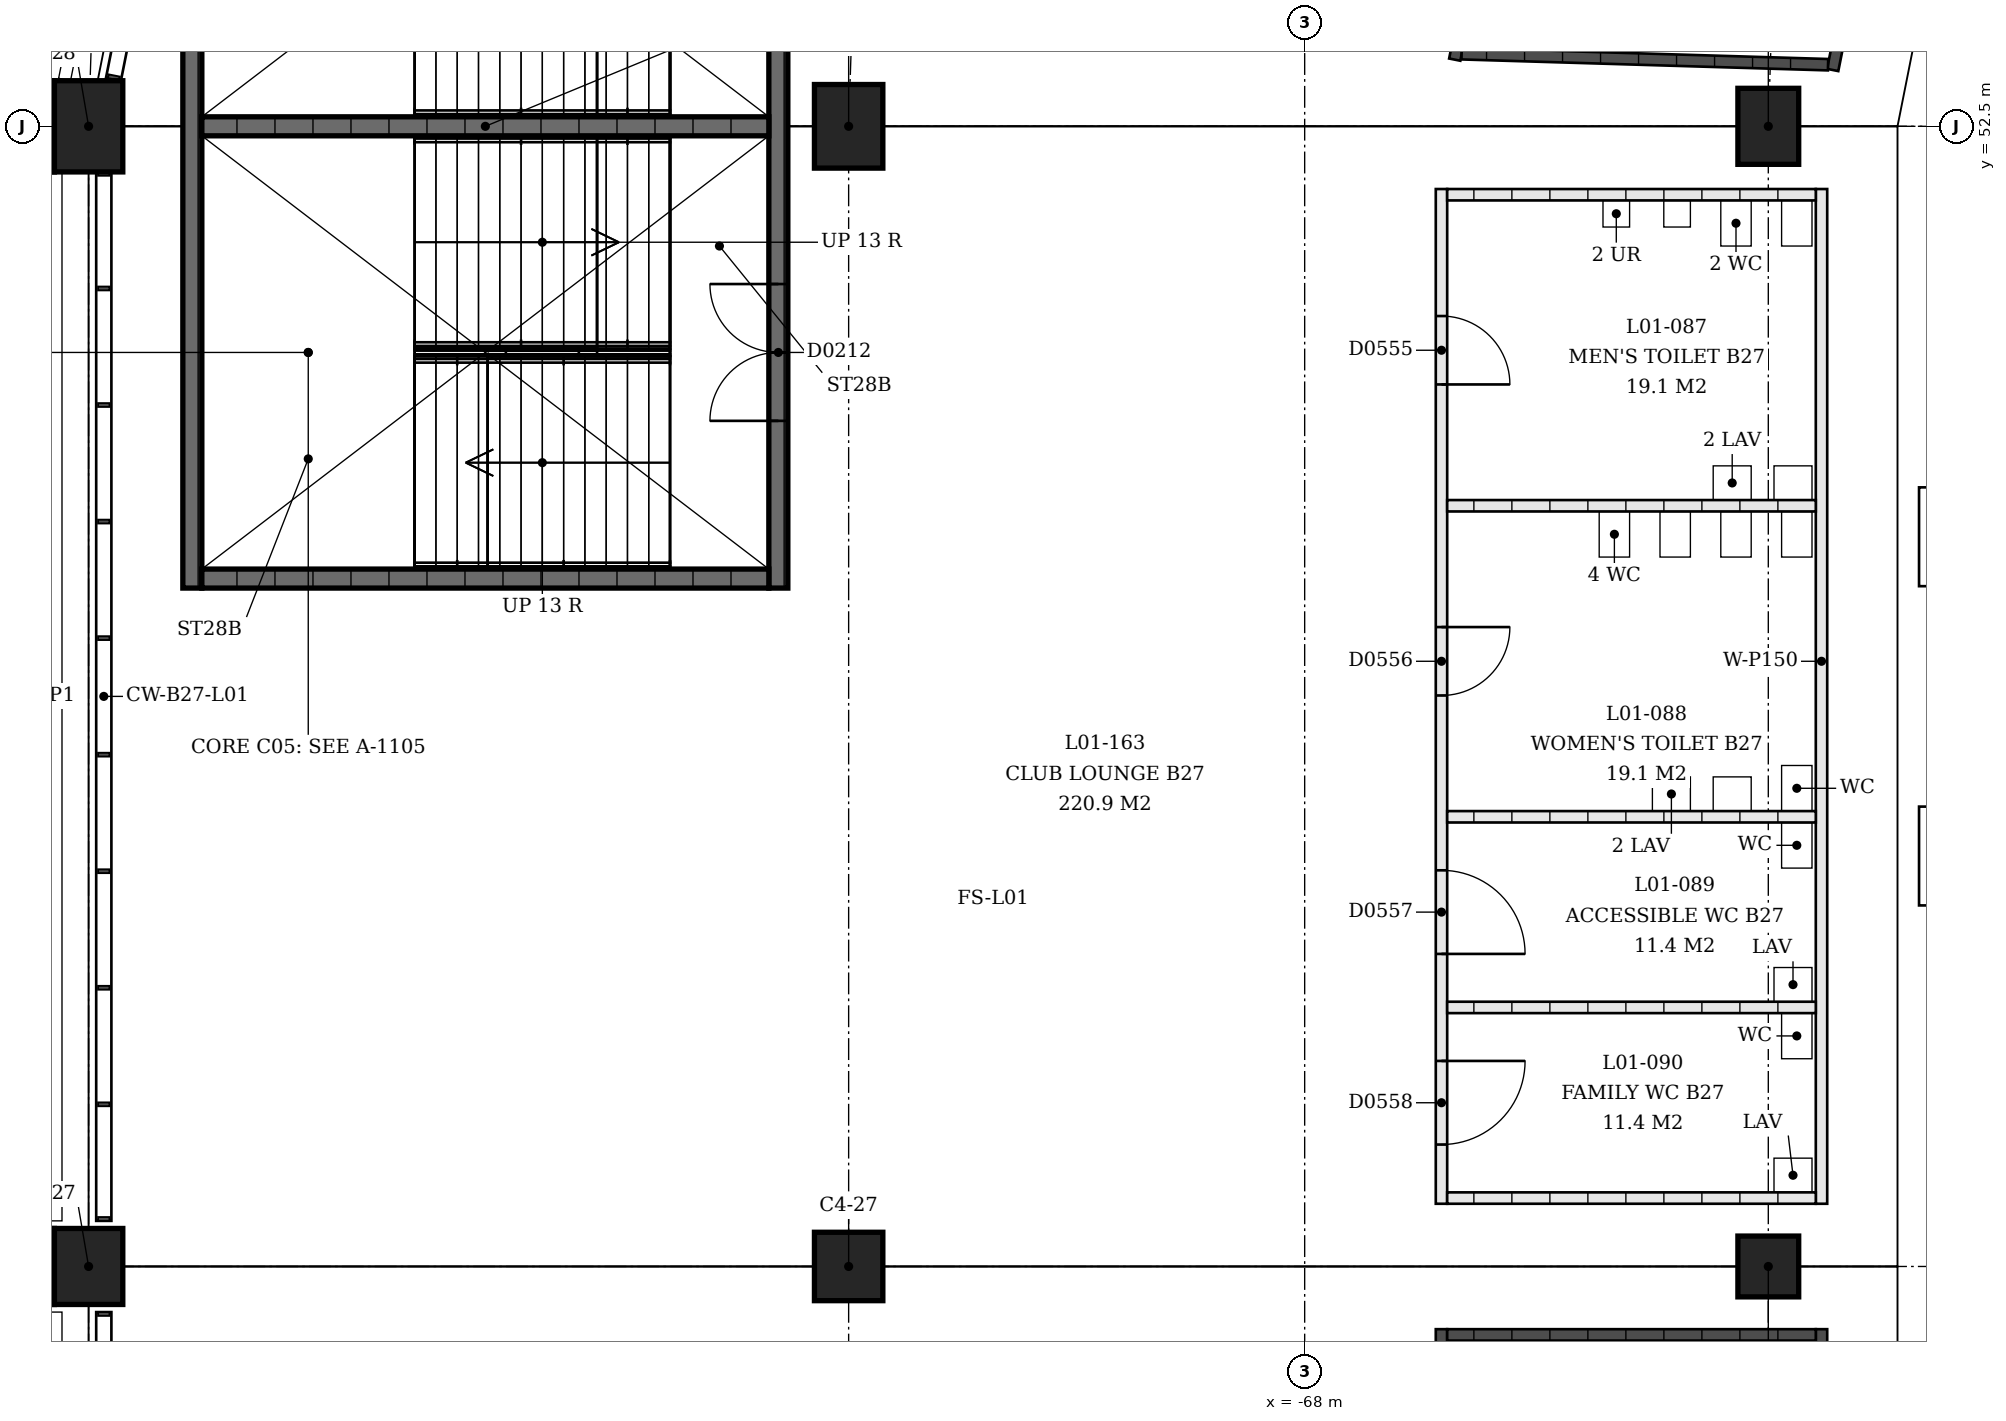
"""IFC4 building model, lengths in metres.
Left out: names, types, materials, properties, quantities, classifications, styles, units other than length and angle.
Written with IfcOpenShell. Run it as: python <this file> out.ifc"""

import sys

from ifc_helpers import new_model, si_unit, direction, frame, frame_2d, origin, origin_2d, place, context, subcontext, project, spatial, rectangle, extrude, element, fill, save


model = new_model("IFC4")
c1 = context("Model", 3, precision=1e-05, world=origin(), true_north=direction((0.0, 1.0)))
c2 = subcontext(c1, "Body", "Model", "MODEL_VIEW")
j1 = project(units=[si_unit("LENGTHUNIT", "METRE"), si_unit("PLANEANGLEUNIT", "RADIAN")], contexts=[c1])
p1 = place(None, origin())
s1 = spatial("IfcSite", under=j1, at=p1, CompositionType="ELEMENT")
p2 = place(p1, origin())
s2 = spatial("IfcBuilding", under=s1, at=p2, CompositionType="ELEMENT")
p3 = place(p2, frame((0.0, 0.0, 4.5)))
s3 = spatial("IfcBuildingStorey", under=s2, at=p3, CompositionType="ELEMENT", Elevation=4.5)
p4 = place(p3, frame((-61.9, 37.5, 0.0), z_axis=(0.0, 0.0, 1.0), x_axis=(0.0, -1.0, 0.0)))
e1 = element("IfcColumn", 1, at=p4, inside=s3, PredefinedType="COLUMN", context=c2, shape_type="SweptSolid", body=[
    extrude(rectangle(XDim=0.8, YDim=0.8, at=origin_2d()), origin(), (0.0, 0.0, 1.0), 4.5),
])
p5 = place(p3, frame((-74.0, 37.5, 0.0), z_axis=(0.0, 0.0, 1.0), x_axis=(0.0, -1.0, 0.0)))
e2 = element("IfcColumn", 2, at=p5, inside=s3, PredefinedType="COLUMN", context=c2, shape_type="SweptSolid", body=[
    extrude(rectangle(XDim=0.9, YDim=0.9, at=origin_2d()), origin(), (0.0, 0.0, 1.0), 4.5),
])
p6 = place(p3, frame((-84.0, 37.5, 0.0), z_axis=(0.0, 0.0, 1.0), x_axis=(0.0, -1.0, 0.0)))
e3 = element("IfcColumn", 3, at=p6, inside=s3, PredefinedType="COLUMN", context=c2, shape_type="SweptSolid", body=[
    extrude(rectangle(XDim=1.0, YDim=0.9, at=origin_2d()), origin(), (0.0, 0.0, 1.0), 4.5),
])
p7 = place(p3, frame((-61.9, 52.5, 0.0), z_axis=(0.0, 0.0, 1.0), x_axis=(0.0, -1.0, 0.0)))
e4 = element("IfcColumn", 4, at=p7, inside=s3, PredefinedType="COLUMN", context=c2, shape_type="SweptSolid", body=[
    extrude(rectangle(XDim=1.0, YDim=0.8, at=origin_2d()), origin(), (0.0, 0.0, 1.0), 4.5),
])
p8 = place(p3, frame((-74.0, 52.5, 0.0), z_axis=(0.0, 0.0, 1.0), x_axis=(0.0, -1.0, 0.0)))
e5 = element("IfcColumn", 5, at=p8, inside=s3, PredefinedType="COLUMN", context=c2, shape_type="SweptSolid", body=[
    extrude(rectangle(XDim=1.1, YDim=0.9, at=origin_2d()), origin(), (0.0, 0.0, 1.0), 4.5),
])
p9 = place(p3, frame((-84.0, 52.5, 0.0), z_axis=(0.0, 0.0, 1.0), x_axis=(0.0, -1.0, 0.0)))
e6 = element("IfcColumn", 6, at=p9, inside=s3, PredefinedType="COLUMN", context=c2, shape_type="SweptSolid", body=[
    extrude(rectangle(XDim=1.2, YDim=0.9, at=origin_2d()), origin(), (0.0, 0.0, 1.0), 4.5),
])
p10 = place(p3, frame((-74.925, 58.575, 0.0), z_axis=(0.0, 0.0, 1.0), x_axis=(0.0, -1.0, 0.0)))
e7 = element("IfcWall", 7, at=p10, inside=s3, PredefinedType="SHEAR", context=c2, shape_type="SweptSolid", body=[
    extrude(rectangle(XDim=12.15, YDim=0.25, at=frame_2d((6.075, 0.0))), origin(), (0.0, 0.0, 1.0), 4.09),
])
p11 = place(p10, frame((2.2, 0.0, 0.0)))
e8 = element("IfcOpeningElement", 8, at=p11, cuts=e7, PredefinedType="OPENING", context=c2, shape_type="SweptSolid", body=[
    extrude(rectangle(XDim=1.8, YDim=2.1, at=frame_2d((0.9, 1.05))), frame((0.0, 0.125, 0.0), z_axis=(0.0, -1.0, 0.0), x_axis=(1.0, 0.0, 0.0)), (0.0, 0.0, 1.0), 0.25),
])
p12 = place(p10, frame((8.15, 0.0, 0.0)))
e9 = element("IfcOpeningElement", 9, at=p12, cuts=e7, PredefinedType="OPENING", context=c2, shape_type="SweptSolid", body=[
    extrude(rectangle(XDim=1.8, YDim=2.1, at=frame_2d((0.9, 1.05))), frame((0.0, 0.125, 0.0), z_axis=(0.0, -1.0, 0.0), x_axis=(1.0, 0.0, 0.0)), (0.0, 0.0, 1.0), 0.25),
])
p13 = place(p3, frame((-82.635, 58.575, 0.0), z_axis=(0.0, 0.0, 1.0), x_axis=(0.0, -1.0, 0.0)))
e10 = element("IfcWall", 10, at=p13, inside=s3, PredefinedType="SHEAR", context=c2, shape_type="SweptSolid", body=[
    extrude(rectangle(XDim=12.15, YDim=0.25, at=frame_2d((6.075, 0.0))), origin(), (0.0, 0.0, 1.0), 4.09),
])
for number, where, z_axis, x_axis in (
    (11, (-75.05, 46.55, 0.0), (0.0, 0.0, 1.0), (-1.0, 0.0, 0.0)),
    (12, (-75.05, 52.5, 0.0), (0.0, 0.0, 1.0), (-1.0, 0.0, 0.0)),
):
    element("IfcWall", number, at=place(p3, frame(where, z_axis=z_axis, x_axis=x_axis)), inside=s3, PredefinedType="SHEAR", context=c2, shape_type="SweptSolid", body=[
        extrude(rectangle(XDim=7.46, YDim=0.25, at=frame_2d((3.73, 0.0))), origin(), (0.0, 0.0, 1.0), 4.09),
    ])
p14 = place(p3, frame((-61.2, 23.325, 0.0), z_axis=(0.0, 0.0, 1.0), x_axis=(0.0, 1.0, 0.0)))
e13 = element("IfcWall", 13, at=p14, inside=s3, PredefinedType="SOLIDWALL", context=c2, shape_type="SweptSolid", body=[
    extrude(rectangle(XDim=13.35, YDim=0.15, at=frame_2d((6.675, 0.0))), origin(), (0.0, 0.0, 1.0), 3.0),
])
p15 = place(p3, frame((-66.2, 23.325, 0.0), z_axis=(0.0, 0.0, 1.0), x_axis=(0.0, 1.0, 0.0)))
e14 = element("IfcWall", 14, at=p15, inside=s3, PredefinedType="SOLIDWALL", context=c2, shape_type="SweptSolid", body=[
    extrude(rectangle(XDim=13.35, YDim=0.15, at=frame_2d((6.675, 0.0))), origin(), (0.0, 0.0, 1.0), 3.0),
])
p16 = place(p15, frame((2.875, 0.0, 0.0)))
e15 = element("IfcOpeningElement", 15, at=p16, cuts=e14, PredefinedType="OPENING", context=c2, shape_type="SweptSolid", body=[
    extrude(rectangle(XDim=1.0, YDim=2.1, at=frame_2d((0.5, 1.05))), frame((0.0, 0.075, 0.0), z_axis=(0.0, -1.0, 0.0), x_axis=(1.0, 0.0, 0.0)), (0.0, 0.0, 1.0), 0.15),
])
p17 = place(p15, frame((9.475, 0.0, 0.0)))
e16 = element("IfcOpeningElement", 16, at=p17, cuts=e14, PredefinedType="OPENING", context=c2, shape_type="SweptSolid", body=[
    extrude(rectangle(XDim=1.0, YDim=2.1, at=frame_2d((0.5, 1.05))), frame((0.0, 0.075, 0.0), z_axis=(0.0, -1.0, 0.0), x_axis=(1.0, 0.0, 0.0)), (0.0, 0.0, 1.0), 0.15),
])
p18 = place(p3, frame((-61.275, 36.6, 0.0), z_axis=(0.0, 0.0, 1.0), x_axis=(-1.0, 0.0, 0.0)))
e17 = element("IfcWall", 17, at=p18, inside=s3, PredefinedType="SOLIDWALL", context=c2, shape_type="SweptSolid", body=[
    extrude(rectangle(XDim=4.85, YDim=0.15, at=frame_2d((2.425, 0.0))), origin(), (0.0, 0.0, 1.0), 3.0),
])
p19 = place(p3, frame((-61.2, 51.675, 0.0), z_axis=(0.0, 0.0, 1.0), x_axis=(0.0, -1.0, 0.0)))
e18 = element("IfcWall", 18, at=p19, inside=s3, PredefinedType="PARTITIONING", context=c2, shape_type="SweptSolid", body=[
    extrude(rectangle(XDim=13.35, YDim=0.15, at=frame_2d((6.675, 0.0))), origin(), (0.0, 0.0, 1.0), 3.0),
])
p20 = place(p3, frame((-66.2, 51.675, 0.0), z_axis=(0.0, 0.0, 1.0), x_axis=(0.0, -1.0, 0.0)))
e19 = element("IfcWall", 19, at=p20, inside=s3, PredefinedType="PARTITIONING", context=c2, shape_type="SweptSolid", body=[
    extrude(rectangle(XDim=13.35, YDim=0.15, at=frame_2d((6.675, 0.0))), origin(), (0.0, 0.0, 1.0), 3.0),
])
p21 = place(p20, frame((1.671, 0.0, 0.0)))
e20 = element("IfcOpeningElement", 20, at=p21, cuts=e19, PredefinedType="OPENING", context=c2, shape_type="SweptSolid", body=[
    extrude(rectangle(XDim=0.9, YDim=2.1, at=frame_2d((0.45, 1.05))), frame((0.0, 0.075, 0.0), z_axis=(0.0, -1.0, 0.0), x_axis=(1.0, 0.0, 0.0)), (0.0, 0.0, 1.0), 0.15),
])
p22 = place(p20, frame((5.763, 0.0, 0.0)))
e21 = element("IfcOpeningElement", 21, at=p22, cuts=e19, PredefinedType="OPENING", context=c2, shape_type="SweptSolid", body=[
    extrude(rectangle(XDim=0.9, YDim=2.1, at=frame_2d((0.45, 1.05))), frame((0.0, 0.075, 0.0), z_axis=(0.0, -1.0, 0.0), x_axis=(1.0, 0.0, 0.0)), (0.0, 0.0, 1.0), 0.15),
])
p23 = place(p20, frame((8.963, 0.0, 0.0)))
e22 = element("IfcOpeningElement", 22, at=p23, cuts=e19, PredefinedType="OPENING", context=c2, shape_type="SweptSolid", body=[
    extrude(rectangle(XDim=1.1, YDim=2.1, at=frame_2d((0.55, 1.05))), frame((0.0, 0.075, 0.0), z_axis=(0.0, -1.0, 0.0), x_axis=(1.0, 0.0, 0.0)), (0.0, 0.0, 1.0), 0.15),
])
p24 = place(p20, frame((11.471, 0.0, 0.0)))
e23 = element("IfcOpeningElement", 23, at=p24, cuts=e19, PredefinedType="OPENING", context=c2, shape_type="SweptSolid", body=[
    extrude(rectangle(XDim=1.1, YDim=2.1, at=frame_2d((0.55, 1.05))), frame((0.0, 0.075, 0.0), z_axis=(0.0, -1.0, 0.0), x_axis=(1.0, 0.0, 0.0)), (0.0, 0.0, 1.0), 0.15),
])
for number, where, z_axis, x_axis in (
    (24, (-61.275, 51.6, 0.0), (0.0, 0.0, 1.0), (-1.0, 0.0, 0.0)),
    (25, (-61.275, 47.508, 0.0), (0.0, 0.0, 1.0), (-1.0, 0.0, 0.0)),
    (26, (-61.275, 43.416, 0.0), (0.0, 0.0, 1.0), (-1.0, 0.0, 0.0)),
    (27, (-61.275, 40.908, 0.0), (0.0, 0.0, 1.0), (-1.0, 0.0, 0.0)),
    (28, (-61.275, 38.4, 0.0), (0.0, 0.0, 1.0), (-1.0, 0.0, 0.0)),
):
    element("IfcWall", number, at=place(p3, frame(where, z_axis=z_axis, x_axis=x_axis)), inside=s3, PredefinedType="PARTITIONING", context=c2, shape_type="SweptSolid", body=[
        extrude(rectangle(XDim=4.85, YDim=0.15, at=frame_2d((2.425, 0.0))), origin(), (0.0, 0.0, 1.0), 3.0),
    ])
p25 = place(p3, frame((-61.052, 53.241, 0.0), z_axis=(0.0, 0.0, 1.0), x_axis=(0.195075759432, 0.980788176969, 0.0)))
e29 = element("IfcWall", 29, at=p25, inside=s3, PredefinedType="SOLIDWALL", context=c2, shape_type="SweptSolid", body=[
    extrude(rectangle(XDim=9.388, YDim=0.15, at=frame_2d((4.694, 0.0))), origin(), (0.0, 0.0, 1.0), 3.0),
])
p26 = place(p3, frame((-66.025, 53.377, 0.0), z_axis=(0.0, 0.0, 1.0), x_axis=(0.195076764682, 0.980787977027, 0.0)))
e30 = element("IfcWall", 30, at=p26, inside=s3, PredefinedType="SOLIDWALL", context=c2, shape_type="SweptSolid", body=[
    extrude(rectangle(XDim=11.114, YDim=0.15, at=frame_2d((5.557, 0.0))), origin(), (0.0, 0.0, 1.0), 3.0),
])
p27 = place(p26, frame((2.319, 0.0, 0.0)))
e31 = element("IfcOpeningElement", 31, at=p27, cuts=e30, PredefinedType="OPENING", context=c2, shape_type="SweptSolid", body=[
    extrude(rectangle(XDim=1.0, YDim=2.1, at=frame_2d((0.5, 1.05))), frame((0.0, 0.075, 0.0), z_axis=(0.0, -1.0, 0.0), x_axis=(1.0, 0.0, 0.0)), (0.0, 0.0, 1.0), 0.15),
])
p28 = place(p26, frame((7.794, 0.0, 0.0)))
e32 = element("IfcOpeningElement", 32, at=p28, cuts=e30, PredefinedType="OPENING", context=c2, shape_type="SweptSolid", body=[
    extrude(rectangle(XDim=1.0, YDim=2.1, at=frame_2d((0.5, 1.05))), frame((0.0, 0.075, 0.0), z_axis=(0.0, -1.0, 0.0), x_axis=(1.0, 0.0, 0.0)), (0.0, 0.0, 1.0), 0.15),
])
p29 = place(p3, frame((-61.114, 53.311, 0.0), z_axis=(0.0, 0.0, 1.0), x_axis=(-0.999552485488, 0.02991368842, 0.0)))
e33 = element("IfcWall", 33, at=p29, inside=s3, PredefinedType="SOLIDWALL", context=c2, shape_type="SweptSolid", body=[
    extrude(rectangle(XDim=4.823, YDim=0.15, at=frame_2d((2.412, 0.0))), origin(), (0.0, 0.0, 1.0), 3.0),
])
p30 = place(p12, origin())
e34 = element("IfcDoor", 34, at=p30, inside=s3, OperationType="DOUBLE_DOOR_SINGLE_SWING", PredefinedType="DOOR", context=c2, shape_type="SweptSolid", body=[
    extrude(rectangle(XDim=1.8, YDim=2.1, at=frame_2d((0.9, 1.05))), frame((0.0, 0.025, 0.0), z_axis=(0.0, -1.0, 0.0), x_axis=(1.0, 0.0, 0.0)), (0.0, 0.0, 1.0), 0.05),
])
fill(e9, e34)
p31 = place(p21, origin())
e35 = element("IfcDoor", 35, at=p31, inside=s3, OperationType="SINGLE_SWING_LEFT", PredefinedType="DOOR", context=c2, shape_type="SweptSolid", body=[
    extrude(rectangle(XDim=0.9, YDim=2.1, at=frame_2d((0.45, 1.05))), frame((0.0, 0.025, 0.0), z_axis=(0.0, -1.0, 0.0), x_axis=(1.0, 0.0, 0.0)), (0.0, 0.0, 1.0), 0.05),
])
fill(e20, e35)
p32 = place(p22, origin())
e36 = element("IfcDoor", 36, at=p32, inside=s3, OperationType="SINGLE_SWING_RIGHT", PredefinedType="DOOR", context=c2, shape_type="SweptSolid", body=[
    extrude(rectangle(XDim=0.9, YDim=2.1, at=frame_2d((0.45, 1.05))), frame((0.0, 0.025, 0.0), z_axis=(0.0, -1.0, 0.0), x_axis=(1.0, 0.0, 0.0)), (0.0, 0.0, 1.0), 0.05),
])
fill(e21, e36)
p33 = place(p23, origin())
e37 = element("IfcDoor", 37, at=p33, inside=s3, OperationType="SINGLE_SWING_LEFT", PredefinedType="DOOR", context=c2, shape_type="SweptSolid", body=[
    extrude(rectangle(XDim=1.1, YDim=2.1, at=frame_2d((0.55, 1.05))), frame((0.0, 0.025, 0.0), z_axis=(0.0, -1.0, 0.0), x_axis=(1.0, 0.0, 0.0)), (0.0, 0.0, 1.0), 0.05),
])
fill(e22, e37)
p34 = place(p24, origin())
e38 = element("IfcDoor", 38, at=p34, inside=s3, OperationType="SINGLE_SWING_RIGHT", PredefinedType="DOOR", context=c2, shape_type="SweptSolid", body=[
    extrude(rectangle(XDim=1.1, YDim=2.1, at=frame_2d((0.55, 1.05))), frame((0.0, 0.025, 0.0), z_axis=(0.0, -1.0, 0.0), x_axis=(1.0, 0.0, 0.0)), (0.0, 0.0, 1.0), 0.05),
])
fill(e23, e38)
save(model, sys.argv[1])
